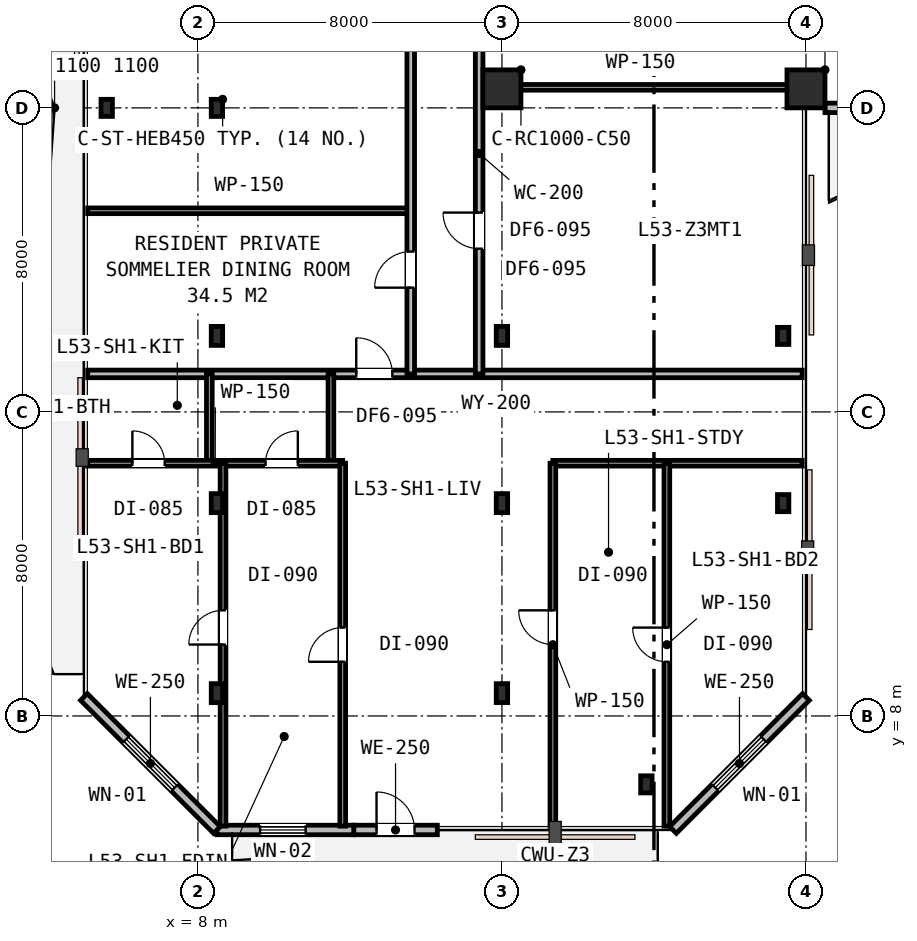
"""IFC4 building model, lengths in metres.
Left out: names, types, materials, properties, quantities, classifications, styles, units other than length and angle.
Written with IfcOpenShell. Run it as: python <this file> out.ifc"""

import sys

from ifc_helpers import new_model, si_unit, direction, frame, frame_2d, origin, origin_2d, place, context, subcontext, project, spatial, rectangle, i_section, extrude, element, fill, save


model = new_model("IFC4")
c1 = context("Model", 3, precision=1e-05, world=origin(), true_north=direction((0.0, 1.0)))
c2 = subcontext(c1, "Body", "Model", "MODEL_VIEW")
j1 = project(units=[si_unit("LENGTHUNIT", "METRE"), si_unit("PLANEANGLEUNIT", "RADIAN")], contexts=[c1])
p1 = place(None, origin())
s1 = spatial("IfcSite", under=j1, at=p1, CompositionType="ELEMENT")
p2 = place(p1, origin())
s2 = spatial("IfcBuilding", under=s1, at=p2, CompositionType="ELEMENT")
p3 = place(p2, frame((0.0, 0.0, 204.6)))
s3 = spatial("IfcBuildingStorey", under=s2, at=p3, CompositionType="ELEMENT", Elevation=204.6)
p4 = place(p3, frame((8.5, 24.0, 0.0), z_axis=(0.0, 0.0, 1.0), x_axis=(1.0, 0.0, 0.0)))
e1 = element("IfcColumn", 1, at=p4, inside=s3, PredefinedType="COLUMN", context=c2, shape_type="SweptSolid", body=[
    extrude(i_section(OverallWidth=0.3, OverallDepth=0.45, WebThickness=0.014, FlangeThickness=0.026, FilletRadius=0.027, at=origin_2d()), origin(), (0.0, 0.0, 1.0), 3.6),
])
for number, where, z_axis, x_axis in (
    (2, (16.0, 24.5, 0.0), (0.0, 0.0, 1.0), (1.0, 0.0, 0.0)),
    (3, (24.0, 24.5, 0.0), (0.0, 0.0, 1.0), (1.0, 0.0, 0.0)),
):
    element("IfcColumn", number, at=place(p3, frame(where, z_axis=z_axis, x_axis=x_axis)), inside=s3, PredefinedType="COLUMN", context=c2, shape_type="SweptSolid", body=[
        extrude(rectangle(XDim=1.0, YDim=1.0, at=origin_2d()), origin(), (0.0, 0.0, 1.0), 3.6),
    ])
for number, where, z_axis, x_axis in (
    (4, (5.6, 24.0, 0.0), (0.0, 0.0, 1.0), (1.0, 0.0, 0.0)),
    (5, (19.8, 6.2, 0.0), (0.0, 0.0, 1.0), (1.0, 0.0, 0.0)),
    (6, (23.4, 13.6, 0.0), (0.0, 0.0, 1.0), (1.0, 0.0, 0.0)),
    (7, (23.4, 18.0, 0.0), (0.0, 0.0, 1.0), (1.0, 0.0, 0.0)),
):
    element("IfcColumn", number, at=place(p3, frame(where, z_axis=z_axis, x_axis=x_axis)), inside=s3, PredefinedType="COLUMN", context=c2, shape_type="SweptSolid", body=[
        extrude(i_section(OverallWidth=0.3, OverallDepth=0.45, WebThickness=0.014, FlangeThickness=0.026, FilletRadius=0.027, at=origin_2d()), origin(), (0.0, 0.0, 1.0), 3.6),
    ])
for number, where, z_axis, x_axis in (
    (8, (8.5, 8.6, 0.0), (0.0, 0.0, 1.0), (1.0, 0.0, 0.0)),
    (9, (16.0, 8.6, 0.0), (0.0, 0.0, 1.0), (1.0, 0.0, 0.0)),
    (10, (8.5, 13.6, 0.0), (0.0, 0.0, 1.0), (1.0, 0.0, 0.0)),
    (11, (16.0, 13.6, 0.0), (0.0, 0.0, 1.0), (1.0, 0.0, 0.0)),
    (12, (8.5, 18.0, 0.0), (0.0, 0.0, 1.0), (1.0, 0.0, 0.0)),
    (13, (16.0, 18.0, 0.0), (0.0, 0.0, 1.0), (1.0, 0.0, 0.0)),
):
    element("IfcColumn", number, at=place(p3, frame(where, z_axis=z_axis, x_axis=x_axis)), inside=s3, PredefinedType="COLUMN", context=c2, shape_type="SweptSolid", body=[
        extrude(i_section(OverallWidth=0.3, OverallDepth=0.5, WebThickness=0.015, FlangeThickness=0.028, FilletRadius=0.027, at=origin_2d()), origin(), (0.0, 0.0, 1.0), 3.6),
    ])
p5 = place(p3, frame((12.1, 5.0, 0.0), z_axis=(0.0, 0.0, 1.0), x_axis=(1.0, 0.0, 0.0)))
e14 = element("IfcWall", 14, at=p5, inside=s3, PredefinedType="STANDARD", context=c2, shape_type="SweptSolid", body=[
    extrude(rectangle(XDim=2.2, YDim=0.25, at=frame_2d((1.1, 0.0))), origin(), (0.0, 0.0, 1.0), 3.24),
])
p6 = place(p5, frame((0.6, 0.0, 0.0)))
e15 = element("IfcOpeningElement", 15, at=p6, cuts=e14, PredefinedType="OPENING", context=c2, shape_type="SweptSolid", body=[
    extrude(rectangle(XDim=1.0, YDim=2.15, at=frame_2d((0.5, 1.075))), frame((0.0, 0.135, 0.0), z_axis=(0.0, -1.0, 0.0), x_axis=(1.0, 0.0, 0.0)), (0.0, 0.0, 1.0), 0.27),
])
p7 = place(p3, frame((8.5, 5.0, 0.0), z_axis=(0.0, 0.0, 1.0), x_axis=(1.0, 0.0, 0.0)))
e16 = element("IfcWall", 16, at=p7, inside=s3, PredefinedType="STANDARD", context=c2, shape_type="SweptSolid", body=[
    extrude(rectangle(XDim=3.6, YDim=0.25, at=frame_2d((1.8, 0.0))), origin(), (0.0, 0.0, 1.0), 3.24),
])
p8 = place(p7, frame((1.135, 0.0, 0.85)))
e17 = element("IfcOpeningElement", 17, at=p8, cuts=e16, PredefinedType="OPENING", context=c2, shape_type="SweptSolid", body=[
    extrude(rectangle(XDim=1.2, YDim=1.6, at=frame_2d((0.6, 0.8))), frame((0.0, 0.135, 0.0), z_axis=(0.0, -1.0, 0.0), x_axis=(1.0, 0.0, 0.0)), (0.0, 0.0, 1.0), 0.27),
])
p9 = place(p3, frame((20.5, 5.0, 0.0), z_axis=(0.0, 0.0, 1.0), x_axis=(0.707106781187, 0.707106781187, 0.0)))
e18 = element("IfcWall", 18, at=p9, inside=s3, PredefinedType="STANDARD", context=c2, shape_type="SweptSolid", body=[
    extrude(rectangle(XDim=4.95, YDim=0.25, at=frame_2d((2.475, 0.0))), origin(), (0.0, 0.0, 1.0), 3.24),
])
p10 = place(p9, frame((1.575, 0.0, 0.75)))
e19 = element("IfcOpeningElement", 19, at=p10, cuts=e18, PredefinedType="OPENING", context=c2, shape_type="SweptSolid", body=[
    extrude(rectangle(XDim=1.8, YDim=1.85, at=frame_2d((0.9, 0.925))), frame((0.0, 0.135, 0.0), z_axis=(0.0, -1.0, 0.0), x_axis=(1.0, 0.0, 0.0)), (0.0, 0.0, 1.0), 0.27),
])
p11 = place(p3, frame((24.5, 24.0, 0.0), z_axis=(0.0, 0.0, 1.0), x_axis=(1.0, 0.0, 0.0)))
e20 = element("IfcWall", 20, at=p11, inside=s3, PredefinedType="STANDARD", context=c2, shape_type="SweptSolid", body=[
    extrude(rectangle(XDim=1.35, YDim=0.25, at=frame_2d((0.675, 0.0))), origin(), (0.0, 0.0, 1.0), 2.95),
])
p12 = place(p3, frame((5.0, 8.5, 0.0), z_axis=(0.0, 0.0, 1.0), x_axis=(0.707106781187, -0.707106781187, 0.0)))
e21 = element("IfcWall", 21, at=p12, inside=s3, PredefinedType="STANDARD", context=c2, shape_type="SweptSolid", body=[
    extrude(rectangle(XDim=4.95, YDim=0.25, at=frame_2d((2.475, 0.0))), origin(), (0.0, 0.0, 1.0), 3.24),
])
p13 = place(p12, frame((1.575, 0.0, 0.75)))
e22 = element("IfcOpeningElement", 22, at=p13, cuts=e21, PredefinedType="OPENING", context=c2, shape_type="SweptSolid", body=[
    extrude(rectangle(XDim=1.8, YDim=1.85, at=frame_2d((0.9, 0.925))), frame((0.0, 0.135, 0.0), z_axis=(0.0, -1.0, 0.0), x_axis=(1.0, 0.0, 0.0)), (0.0, 0.0, 1.0), 0.27),
])
p14 = place(p3, frame((5.1, 17.0, 0.0), z_axis=(0.0, 0.0, 1.0), x_axis=(1.0, 0.0, 0.0)))
e23 = element("IfcWall", 23, at=p14, inside=s3, PredefinedType="PARTITIONING", context=c2, shape_type="SweptSolid", body=[
    extrude(rectangle(XDim=18.8, YDim=0.2, at=frame_2d((9.4, 0.0))), origin(), (0.0, 0.0, 1.0), 2.63),
])
p15 = place(p14, frame((7.066, 0.0, 0.0)))
e24 = element("IfcOpeningElement", 24, at=p15, cuts=e23, PredefinedType="OPENING", context=c2, shape_type="SweptSolid", body=[
    extrude(rectangle(XDim=0.95, YDim=2.15, at=frame_2d((0.475, 1.075))), frame((0.0, 0.11, 0.0), z_axis=(0.0, -1.0, 0.0), x_axis=(1.0, 0.0, 0.0)), (0.0, 0.0, 1.0), 0.22),
])
p16 = place(p3, frame((5.1, 21.292, 0.0), z_axis=(0.0, 0.0, 1.0), x_axis=(1.0, 0.0, 0.0)))
e25 = element("IfcWall", 25, at=p16, inside=s3, PredefinedType="PARTITIONING", context=c2, shape_type="SweptSolid", body=[
    extrude(rectangle(XDim=8.5, YDim=0.15, at=frame_2d((4.25, 0.0))), origin(), (0.0, 0.0, 1.0), 2.63),
])
p17 = place(p3, frame((13.6, 17.0, 0.0), z_axis=(0.0, 0.0, 1.0), x_axis=(0.0, 1.0, 0.0)))
e26 = element("IfcWall", 26, at=p17, inside=s3, PredefinedType="PARTITIONING", context=c2, shape_type="SweptSolid", body=[
    extrude(rectangle(XDim=11.6, YDim=0.2, at=frame_2d((5.8, 0.0))), origin(), (0.0, 0.0, 1.0), 2.63),
])
p18 = place(p17, frame((8.996, 0.0, 0.0)))
e27 = element("IfcOpeningElement", 27, at=p18, cuts=e26, PredefinedType="OPENING", context=c2, shape_type="SweptSolid", body=[
    extrude(rectangle(XDim=0.95, YDim=2.15, at=frame_2d((0.475, 1.075))), frame((0.0, 0.11, 0.0), z_axis=(0.0, -1.0, 0.0), x_axis=(1.0, 0.0, 0.0)), (0.0, 0.0, 1.0), 0.22),
])
p19 = place(p17, frame((2.269, 0.0, 0.0)))
e28 = element("IfcOpeningElement", 28, at=p19, cuts=e26, PredefinedType="OPENING", context=c2, shape_type="SweptSolid", body=[
    extrude(rectangle(XDim=0.95, YDim=2.15, at=frame_2d((0.475, 1.075))), frame((0.0, 0.11, 0.0), z_axis=(0.0, -1.0, 0.0), x_axis=(1.0, 0.0, 0.0)), (0.0, 0.0, 1.0), 0.22),
])
p20 = place(p3, frame((15.4, 24.54, 0.0), z_axis=(0.0, 0.0, 1.0), x_axis=(1.0, 0.0, 0.0)))
e29 = element("IfcWall", 29, at=p20, inside=s3, PredefinedType="PARTITIONING", context=c2, shape_type="SweptSolid", body=[
    extrude(rectangle(XDim=8.5, YDim=0.15, at=frame_2d((4.25, 0.0))), origin(), (0.0, 0.0, 1.0), 2.63),
])
p21 = place(p3, frame((15.4, 17.0, 0.0), z_axis=(0.0, 0.0, 1.0), x_axis=(0.0, 1.0, 0.0)))
e30 = element("IfcWall", 30, at=p21, inside=s3, PredefinedType="PARTITIONING", context=c2, shape_type="SweptSolid", body=[
    extrude(rectangle(XDim=11.6, YDim=0.2, at=frame_2d((5.8, 0.0))), origin(), (0.0, 0.0, 1.0), 2.63),
])
p22 = place(p21, frame((9.095, 0.0, 0.0)))
e31 = element("IfcOpeningElement", 31, at=p22, cuts=e30, PredefinedType="OPENING", context=c2, shape_type="SweptSolid", body=[
    extrude(rectangle(XDim=0.95, YDim=2.15, at=frame_2d((0.475, 1.075))), frame((0.0, 0.11, 0.0), z_axis=(0.0, -1.0, 0.0), x_axis=(1.0, 0.0, 0.0)), (0.0, 0.0, 1.0), 0.22),
])
p23 = place(p21, frame((3.295, 0.0, 0.0)))
e32 = element("IfcOpeningElement", 32, at=p23, cuts=e30, PredefinedType="OPENING", context=c2, shape_type="SweptSolid", body=[
    extrude(rectangle(XDim=0.95, YDim=2.15, at=frame_2d((0.475, 1.075))), frame((0.0, 0.11, 0.0), z_axis=(0.0, -1.0, 0.0), x_axis=(1.0, 0.0, 0.0)), (0.0, 0.0, 1.0), 0.22),
])
p24 = place(p3, frame((11.5, 14.65, 0.0), z_axis=(0.0, 0.0, 1.0), x_axis=(0.0, 1.0, 0.0)))
e33 = element("IfcWall", 33, at=p24, inside=s3, PredefinedType="PARTITIONING", context=c2, shape_type="SweptSolid", body=[
    extrude(rectangle(XDim=2.35, YDim=0.15, at=frame_2d((1.175, 0.0))), origin(), (0.0, 0.0, 1.0), 2.93),
])
p25 = place(p3, frame((8.3, 14.65, 0.0), z_axis=(0.0, 0.0, 1.0), x_axis=(0.0, 1.0, 0.0)))
e34 = element("IfcWall", 34, at=p25, inside=s3, PredefinedType="PARTITIONING", context=c2, shape_type="SweptSolid", body=[
    extrude(rectangle(XDim=2.35, YDim=0.15, at=frame_2d((1.175, 0.0))), origin(), (0.0, 0.0, 1.0), 2.63),
])
p26 = place(p3, frame((5.1, 14.65, 0.0), z_axis=(0.0, 0.0, 1.0), x_axis=(1.0, 0.0, 0.0)))
e35 = element("IfcWall", 35, at=p26, inside=s3, PredefinedType="PARTITIONING", context=c2, shape_type="SweptSolid", body=[
    extrude(rectangle(XDim=6.71, YDim=0.15, at=frame_2d((3.355, 0.0))), origin(), (0.0, 0.0, 1.0), 2.63),
])
p27 = place(p26, frame((1.175, 0.0, 0.0)))
e36 = element("IfcOpeningElement", 36, at=p27, cuts=e35, PredefinedType="OPENING", context=c2, shape_type="SweptSolid", body=[
    extrude(rectangle(XDim=0.85, YDim=2.15, at=frame_2d((0.425, 1.075))), frame((0.0, 0.085, 0.0), z_axis=(0.0, -1.0, 0.0), x_axis=(1.0, 0.0, 0.0)), (0.0, 0.0, 1.0), 0.17),
])
p28 = place(p26, frame((4.679, 0.0, 0.0)))
e37 = element("IfcOpeningElement", 37, at=p28, cuts=e35, PredefinedType="OPENING", context=c2, shape_type="SweptSolid", body=[
    extrude(rectangle(XDim=0.85, YDim=2.15, at=frame_2d((0.425, 1.075))), frame((0.0, 0.085, 0.0), z_axis=(0.0, -1.0, 0.0), x_axis=(1.0, 0.0, 0.0)), (0.0, 0.0, 1.0), 0.17),
])
p29 = place(p3, frame((17.34, 14.65, 0.0), z_axis=(0.0, 0.0, 1.0), x_axis=(1.0, 0.0, 0.0)))
e38 = element("IfcWall", 38, at=p29, inside=s3, PredefinedType="PARTITIONING", context=c2, shape_type="SweptSolid", body=[
    extrude(rectangle(XDim=6.56, YDim=0.15, at=frame_2d((3.28, 0.0))), origin(), (0.0, 0.0, 1.0), 2.93),
])
p30 = place(p3, frame((8.66, 5.1, 0.0), z_axis=(0.0, 0.0, 1.0), x_axis=(0.0, 1.0, 0.0)))
e39 = element("IfcWall", 39, at=p30, inside=s3, PredefinedType="PARTITIONING", context=c2, shape_type="SweptSolid", body=[
    extrude(rectangle(XDim=9.55, YDim=0.15, at=frame_2d((4.775, 0.0))), origin(), (0.0, 0.0, 1.0), 2.63),
])
p31 = place(p30, frame((4.779, 0.0, 0.0)))
e40 = element("IfcOpeningElement", 40, at=p31, cuts=e39, PredefinedType="OPENING", context=c2, shape_type="SweptSolid", body=[
    extrude(rectangle(XDim=0.9, YDim=2.15, at=frame_2d((0.45, 1.075))), frame((0.0, 0.085, 0.0), z_axis=(0.0, -1.0, 0.0), x_axis=(1.0, 0.0, 0.0)), (0.0, 0.0, 1.0), 0.17),
])
p32 = place(p3, frame((20.34, 5.1, 0.0), z_axis=(0.0, 0.0, 1.0), x_axis=(0.0, 1.0, 0.0)))
e41 = element("IfcWall", 41, at=p32, inside=s3, PredefinedType="PARTITIONING", context=c2, shape_type="SweptSolid", body=[
    extrude(rectangle(XDim=9.55, YDim=0.15, at=frame_2d((4.775, 0.0))), origin(), (0.0, 0.0, 1.0), 2.63),
])
p33 = place(p32, frame((4.325, 0.0, 0.0)))
e42 = element("IfcOpeningElement", 42, at=p33, cuts=e41, PredefinedType="OPENING", context=c2, shape_type="SweptSolid", body=[
    extrude(rectangle(XDim=0.9, YDim=2.15, at=frame_2d((0.45, 1.075))), frame((0.0, 0.085, 0.0), z_axis=(0.0, -1.0, 0.0), x_axis=(1.0, 0.0, 0.0)), (0.0, 0.0, 1.0), 0.17),
])
p34 = place(p3, frame((17.34, 5.1, 0.0), z_axis=(0.0, 0.0, 1.0), x_axis=(0.0, 1.0, 0.0)))
e43 = element("IfcWall", 43, at=p34, inside=s3, PredefinedType="PARTITIONING", context=c2, shape_type="SweptSolid", body=[
    extrude(rectangle(XDim=9.55, YDim=0.15, at=frame_2d((4.775, 0.0))), origin(), (0.0, 0.0, 1.0), 2.63),
])
p35 = place(p34, frame((4.779, 0.0, 0.0)))
e44 = element("IfcOpeningElement", 44, at=p35, cuts=e43, PredefinedType="OPENING", context=c2, shape_type="SweptSolid", body=[
    extrude(rectangle(XDim=0.9, YDim=2.15, at=frame_2d((0.45, 1.075))), frame((0.0, 0.085, 0.0), z_axis=(0.0, -1.0, 0.0), x_axis=(1.0, 0.0, 0.0)), (0.0, 0.0, 1.0), 0.17),
])
p36 = place(p3, frame((11.81, 5.1, 0.0), z_axis=(0.0, 0.0, 1.0), x_axis=(0.0, 1.0, 0.0)))
e45 = element("IfcWall", 45, at=p36, inside=s3, PredefinedType="PARTITIONING", context=c2, shape_type="SweptSolid", body=[
    extrude(rectangle(XDim=9.55, YDim=0.15, at=frame_2d((4.775, 0.0))), origin(), (0.0, 0.0, 1.0), 2.63),
])
p37 = place(p36, frame((4.325, 0.0, 0.0)))
e46 = element("IfcOpeningElement", 46, at=p37, cuts=e45, PredefinedType="OPENING", context=c2, shape_type="SweptSolid", body=[
    extrude(rectangle(XDim=0.9, YDim=2.15, at=frame_2d((0.45, 1.075))), frame((0.0, 0.085, 0.0), z_axis=(0.0, -1.0, 0.0), x_axis=(1.0, 0.0, 0.0)), (0.0, 0.0, 1.0), 0.17),
])
p38 = place(p6, origin())
e47 = element("IfcDoor", 47, at=p38, inside=s3, OperationType="SINGLE_SWING_LEFT", PredefinedType="DOOR", context=c2, shape_type="SweptSolid", body=[
    extrude(rectangle(XDim=1.0, YDim=2.15, at=frame_2d((0.5, 1.075))), frame((0.0, 0.025, 0.0), z_axis=(0.0, -1.0, 0.0), x_axis=(1.0, 0.0, 0.0)), (0.0, 0.0, 1.0), 0.05),
])
fill(e15, e47)
p39 = place(p8, origin())
e48 = element("IfcWindow", 48, at=p39, inside=s3, PartitioningType="SINGLE_PANEL", PredefinedType="WINDOW", context=c2, shape_type="SweptSolid", body=[
    extrude(rectangle(XDim=1.2, YDim=1.6, at=frame_2d((0.6, 0.8))), frame((0.0, 0.03, 0.0), z_axis=(0.0, -1.0, 0.0), x_axis=(1.0, 0.0, 0.0)), (0.0, 0.0, 1.0), 0.06),
])
fill(e17, e48)
p40 = place(p10, origin())
e49 = element("IfcWindow", 49, at=p40, inside=s3, PartitioningType="SINGLE_PANEL", PredefinedType="WINDOW", context=c2, shape_type="SweptSolid", body=[
    extrude(rectangle(XDim=1.8, YDim=1.85, at=frame_2d((0.9, 0.925))), frame((0.0, 0.03, 0.0), z_axis=(0.0, -1.0, 0.0), x_axis=(1.0, 0.0, 0.0)), (0.0, 0.0, 1.0), 0.06),
])
fill(e19, e49)
p41 = place(p13, origin())
e50 = element("IfcWindow", 50, at=p41, inside=s3, PartitioningType="SINGLE_PANEL", PredefinedType="WINDOW", context=c2, shape_type="SweptSolid", body=[
    extrude(rectangle(XDim=1.8, YDim=1.85, at=frame_2d((0.9, 0.925))), frame((0.0, 0.03, 0.0), z_axis=(0.0, -1.0, 0.0), x_axis=(1.0, 0.0, 0.0)), (0.0, 0.0, 1.0), 0.06),
])
fill(e22, e50)
p42 = place(p19, origin())
e51 = element("IfcDoor", 51, at=p42, inside=s3, OperationType="SINGLE_SWING_LEFT", PredefinedType="DOOR", context=c2, shape_type="SweptSolid", body=[
    extrude(rectangle(XDim=0.95, YDim=2.15, at=frame_2d((0.475, 1.075))), frame((0.0, 0.025, 0.0), z_axis=(0.0, -1.0, 0.0), x_axis=(1.0, 0.0, 0.0)), (0.0, 0.0, 1.0), 0.05),
])
fill(e28, e51)
p43 = place(p23, origin())
e52 = element("IfcDoor", 52, at=p43, inside=s3, OperationType="SINGLE_SWING_RIGHT", PredefinedType="DOOR", context=c2, shape_type="SweptSolid", body=[
    extrude(rectangle(XDim=0.95, YDim=2.15, at=frame_2d((0.475, 1.075))), frame((0.0, 0.025, 0.0), z_axis=(0.0, -1.0, 0.0), x_axis=(1.0, 0.0, 0.0)), (0.0, 0.0, 1.0), 0.05),
])
fill(e32, e52)
p44 = place(p15, origin())
e53 = element("IfcDoor", 53, at=p44, inside=s3, OperationType="SINGLE_SWING_LEFT", PredefinedType="DOOR", context=c2, shape_type="SweptSolid", body=[
    extrude(rectangle(XDim=0.95, YDim=2.15, at=frame_2d((0.475, 1.075))), frame((0.0, 0.025, 0.0), z_axis=(0.0, -1.0, 0.0), x_axis=(1.0, 0.0, 0.0)), (0.0, 0.0, 1.0), 0.05),
])
fill(e24, e53)
p45 = place(p27, origin())
e54 = element("IfcDoor", 54, at=p45, inside=s3, OperationType="SINGLE_SWING_LEFT", PredefinedType="DOOR", context=c2, shape_type="SweptSolid", body=[
    extrude(rectangle(XDim=0.85, YDim=2.15, at=frame_2d((0.425, 1.075))), frame((0.0, 0.025, 0.0), z_axis=(0.0, -1.0, 0.0), x_axis=(1.0, 0.0, 0.0)), (0.0, 0.0, 1.0), 0.05),
])
fill(e36, e54)
p46 = place(p28, origin())
e55 = element("IfcDoor", 55, at=p46, inside=s3, OperationType="SINGLE_SWING_RIGHT", PredefinedType="DOOR", context=c2, shape_type="SweptSolid", body=[
    extrude(rectangle(XDim=0.85, YDim=2.15, at=frame_2d((0.425, 1.075))), frame((0.0, 0.025, 0.0), z_axis=(0.0, -1.0, 0.0), x_axis=(1.0, 0.0, 0.0)), (0.0, 0.0, 1.0), 0.05),
])
fill(e37, e55)
p47 = place(p31, origin())
e56 = element("IfcDoor", 56, at=p47, inside=s3, OperationType="SINGLE_SWING_LEFT", PredefinedType="DOOR", context=c2, shape_type="SweptSolid", body=[
    extrude(rectangle(XDim=0.9, YDim=2.15, at=frame_2d((0.45, 1.075))), frame((0.0, 0.025, 0.0), z_axis=(0.0, -1.0, 0.0), x_axis=(1.0, 0.0, 0.0)), (0.0, 0.0, 1.0), 0.05),
])
fill(e40, e56)
p48 = place(p33, origin())
e57 = element("IfcDoor", 57, at=p48, inside=s3, OperationType="SINGLE_SWING_RIGHT", PredefinedType="DOOR", context=c2, shape_type="SweptSolid", body=[
    extrude(rectangle(XDim=0.9, YDim=2.15, at=frame_2d((0.45, 1.075))), frame((0.0, 0.025, 0.0), z_axis=(0.0, -1.0, 0.0), x_axis=(1.0, 0.0, 0.0)), (0.0, 0.0, 1.0), 0.05),
])
fill(e42, e57)
p49 = place(p35, origin())
e58 = element("IfcDoor", 58, at=p49, inside=s3, OperationType="SINGLE_SWING_RIGHT", PredefinedType="DOOR", context=c2, shape_type="SweptSolid", body=[
    extrude(rectangle(XDim=0.9, YDim=2.15, at=frame_2d((0.45, 1.075))), frame((0.0, 0.025, 0.0), z_axis=(0.0, -1.0, 0.0), x_axis=(1.0, 0.0, 0.0)), (0.0, 0.0, 1.0), 0.05),
])
fill(e44, e58)
p50 = place(p37, origin())
e59 = element("IfcDoor", 59, at=p50, inside=s3, OperationType="SINGLE_SWING_LEFT", PredefinedType="DOOR", context=c2, shape_type="SweptSolid", body=[
    extrude(rectangle(XDim=0.9, YDim=2.15, at=frame_2d((0.45, 1.075))), frame((0.0, 0.025, 0.0), z_axis=(0.0, -1.0, 0.0), x_axis=(1.0, 0.0, 0.0)), (0.0, 0.0, 1.0), 0.05),
])
fill(e46, e59)
save(model, sys.argv[1])
